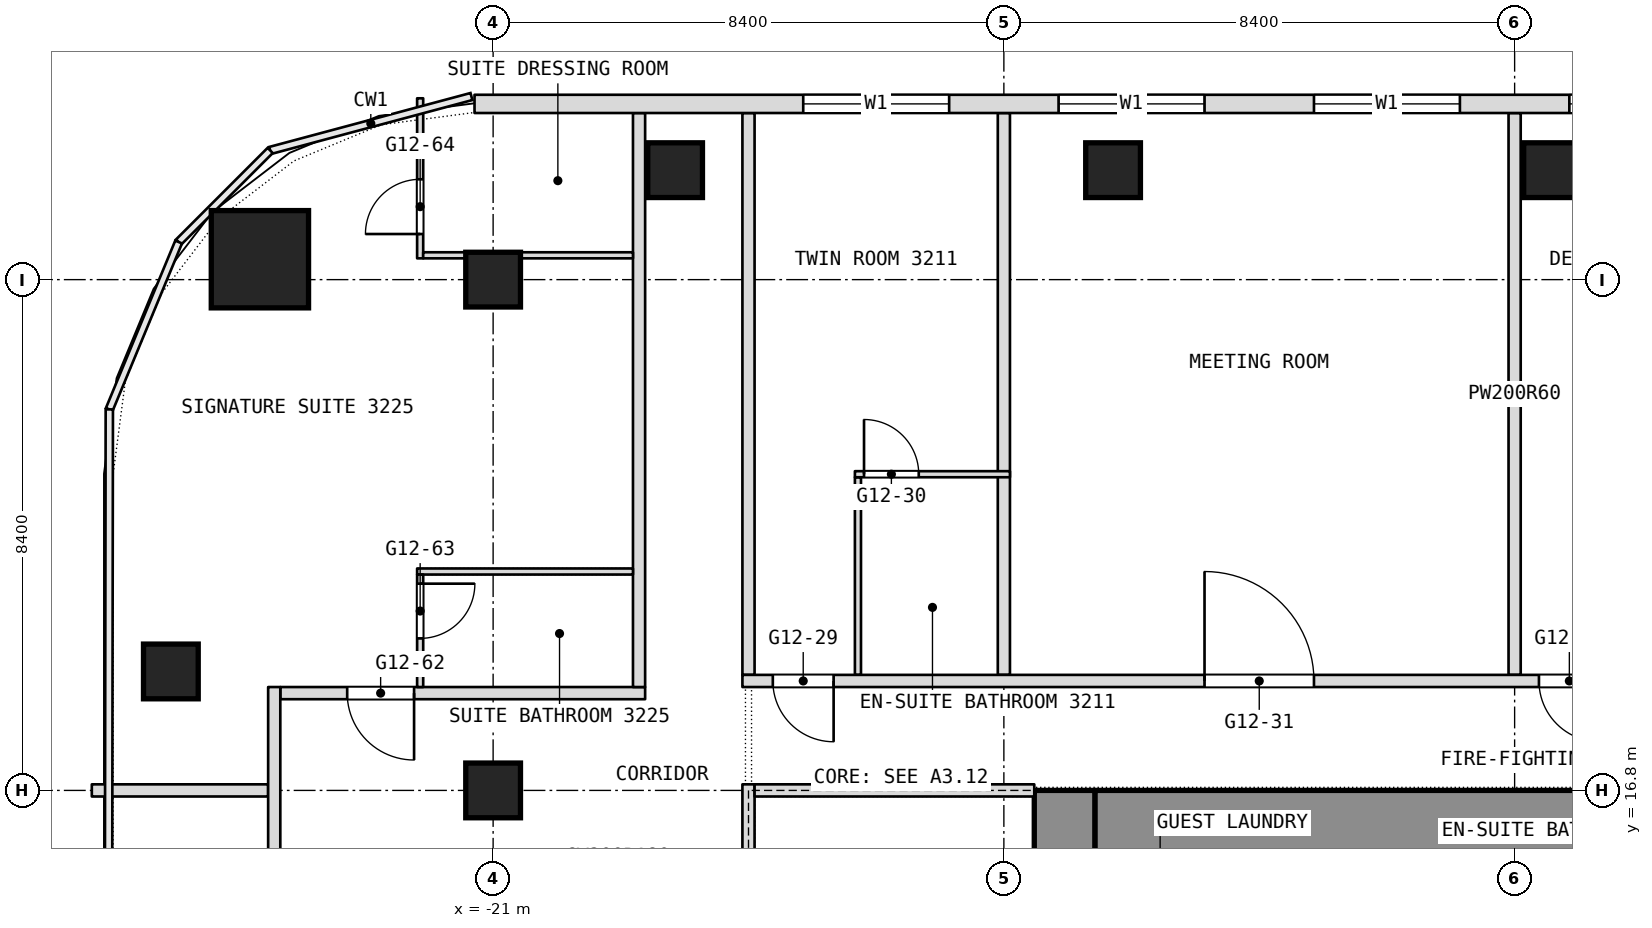
"""IFC4 building model, lengths in metres.
Left out: names, types, materials, properties, quantities, classifications, styles, units other than length and angle.
Written with IfcOpenShell. Run it as: python <this file> out.ifc"""

import sys

from ifc_helpers import new_model, si_unit, direction, frame, frame_2d, origin, origin_2d, place, context, subcontext, project, spatial, rectangle, extrude, element, fill, save


model = new_model("IFC4")
c1 = context("Model", 3, precision=1e-05, world=origin(), true_north=direction((0.0, 1.0)))
c2 = subcontext(c1, "Body", "Model", "MODEL_VIEW")
j1 = project(units=[si_unit("LENGTHUNIT", "METRE"), si_unit("PLANEANGLEUNIT", "RADIAN")], contexts=[c1])
p1 = place(None, origin())
s1 = spatial("IfcSite", under=j1, at=p1, CompositionType="ELEMENT")
p2 = place(p1, origin())
s2 = spatial("IfcBuilding", under=s1, at=p2, CompositionType="ELEMENT")
p3 = place(p2, frame((0.0, 0.0, 140.9)))
s3 = spatial("IfcBuildingStorey", under=s2, at=p3, CompositionType="ELEMENT", Elevation=140.9)
p4 = place(p3, frame((-11.6, 0.0, 0.0), z_axis=(0.0, 0.0, 1.0), x_axis=(0.0, 1.0, 0.0)))
e1 = element("IfcWall", 1, at=p4, inside=s3, PredefinedType="SHEAR", context=c2, shape_type="SweptSolid", body=[
    extrude(rectangle(XDim=16.8, YDim=1.0, at=frame_2d((8.4, 0.0))), origin(), (0.0, 0.0, 1.0), 3.6),
])
p5 = place(p4, frame((1.837, 0.0, 0.0)))
e2 = element("IfcOpeningElement", 2, at=p5, cuts=e1, PredefinedType="OPENING", context=c2, shape_type="SweptSolid", body=[
    extrude(rectangle(XDim=0.9, YDim=2.1, at=frame_2d((0.45, 1.05))), frame((0.0, 0.5, 0.0), z_axis=(0.0, -1.0, 0.0), x_axis=(1.0, 0.0, 0.0)), (0.0, 0.0, 1.0), 1.0),
])
p6 = place(p4, frame((4.462, 0.0, 0.0)))
e3 = element("IfcOpeningElement", 3, at=p6, cuts=e1, PredefinedType="OPENING", context=c2, shape_type="SweptSolid", body=[
    extrude(rectangle(XDim=0.9, YDim=2.1, at=frame_2d((0.45, 1.05))), frame((0.0, 0.5, 0.0), z_axis=(0.0, -1.0, 0.0), x_axis=(1.0, 0.0, 0.0)), (0.0, 0.0, 1.0), 1.0),
])
p7 = place(p4, frame((6.825, 0.0, 0.0)))
e4 = element("IfcOpeningElement", 4, at=p7, cuts=e1, PredefinedType="OPENING", context=c2, shape_type="SweptSolid", body=[
    extrude(rectangle(XDim=1.2, YDim=2.1, at=frame_2d((0.6, 1.05))), frame((0.0, 0.5, 0.0), z_axis=(0.0, -1.0, 0.0), x_axis=(1.0, 0.0, 0.0)), (0.0, 0.0, 1.0), 1.0),
])
p8 = place(p4, frame((12.3, 0.0, 0.0)))
e5 = element("IfcOpeningElement", 5, at=p8, cuts=e1, PredefinedType="OPENING", context=c2, shape_type="SweptSolid", body=[
    extrude(rectangle(XDim=0.9, YDim=2.1, at=frame_2d((0.45, 1.05))), frame((0.0, 0.5, 0.0), z_axis=(0.0, -1.0, 0.0), x_axis=(1.0, 0.0, 0.0)), (0.0, 0.0, 1.0), 1.0),
])
p9 = place(p4, frame((8.775, 0.0, 0.0)))
e6 = element("IfcOpeningElement", 6, at=p9, cuts=e1, PredefinedType="OPENING", context=c2, shape_type="SweptSolid", body=[
    extrude(rectangle(XDim=1.2, YDim=2.1, at=frame_2d((0.6, 1.05))), frame((0.0, 0.5, 0.0), z_axis=(0.0, -1.0, 0.0), x_axis=(1.0, 0.0, 0.0)), (0.0, 0.0, 1.0), 1.0),
])
p10 = place(p3, frame((-11.1, 16.3, 0.0), z_axis=(0.0, 0.0, 1.0), x_axis=(1.0, 0.0, 0.0)))
e7 = element("IfcWall", 7, at=p10, inside=s3, PredefinedType="SHEAR", context=c2, shape_type="SweptSolid", body=[
    extrude(rectangle(XDim=22.2, YDim=1.0, at=frame_2d((11.1, 0.0))), origin(), (0.0, 0.0, 1.0), 3.6),
])
p11 = place(p3, frame((-24.835, 25.535, 0.0), z_axis=(0.0, 0.0, 1.0), x_axis=(1.0, 0.0, 0.0)))
e8 = element("IfcColumn", 8, at=p11, inside=s3, PredefinedType="COLUMN", context=c2, shape_type="SweptSolid", body=[
    extrude(rectangle(XDim=1.6, YDim=1.6, at=origin_2d()), origin(), (0.0, 0.0, 1.0), 3.6),
])
for number, where, z_axis, x_axis in (
    (9, (-21.0, 16.8, 0.0), (0.0, 0.0, 1.0), (1.0, 0.0, 0.0)),
    (10, (-21.0, 25.2, 0.0), (0.0, 0.0, 1.0), (1.0, 0.0, 0.0)),
    (11, (-26.3, 18.756, 0.0), (0.0, 0.0, 1.0), (1.0, 0.0, 0.0)),
    (12, (-18.007, 27.0, 0.0), (0.0, 0.0, 1.0), (1.0, 0.0, 0.0)),
    (13, (-10.804, 27.0, 0.0), (0.0, 0.0, 1.0), (1.0, 0.0, 0.0)),
    (14, (-3.601, 27.0, 0.0), (0.0, 0.0, 1.0), (1.0, 0.0, 0.0)),
):
    element("IfcColumn", number, at=place(p3, frame(where, z_axis=z_axis, x_axis=x_axis)), inside=s3, PredefinedType="COLUMN", context=c2, shape_type="SweptSolid", body=[
        extrude(rectangle(XDim=0.9, YDim=0.9, at=origin_2d()), origin(), (0.0, 0.0, 1.0), 3.6),
    ])
for number, where, z_axis, x_axis in (
    (15, (-4.2, 18.7, 0.0), (0.0, 0.0, 1.0), (0.0, 1.0, 0.0)),
    (16, (-12.6, 18.7, 0.0), (0.0, 0.0, 1.0), (0.0, 1.0, 0.0)),
):
    element("IfcWall", number, at=place(p3, frame(where, z_axis=z_axis, x_axis=x_axis)), inside=s3, PredefinedType="PARTITIONING", context=c2, shape_type="SweptSolid", body=[
        extrude(rectangle(XDim=9.24, YDim=0.2, at=frame_2d((4.62, 0.0))), origin(), (0.0, 0.0, 1.0), 3.34),
    ])
p12 = place(p3, frame((-15.0, 18.7, 0.0), z_axis=(0.0, 0.0, 1.0), x_axis=(0.0, 1.0, 0.0)))
e17 = element("IfcWall", 17, at=p12, inside=s3, PredefinedType="PARTITIONING", context=c2, shape_type="SweptSolid", body=[
    extrude(rectangle(XDim=3.25, YDim=0.1, at=frame_2d((1.625, 0.0))), origin(), (0.0, 0.0, 1.0), 3.34),
])
p13 = place(p3, frame((-16.8, 18.7, 0.0), z_axis=(0.0, 0.0, 1.0), x_axis=(0.0, 1.0, 0.0)))
e18 = element("IfcWall", 18, at=p13, inside=s3, PredefinedType="PARTITIONING", context=c2, shape_type="SweptSolid", body=[
    extrude(rectangle(XDim=9.24, YDim=0.2, at=frame_2d((4.62, 0.0))), origin(), (0.0, 0.0, 1.0), 3.34),
])
p14 = place(p3, frame((-27.6, 16.8, 0.0), z_axis=(0.0, 0.0, 1.0), x_axis=(1.0, 0.0, 0.0)))
e19 = element("IfcWall", 19, at=p14, inside=s3, PredefinedType="PARTITIONING", context=c2, shape_type="SweptSolid", body=[
    extrude(rectangle(XDim=2.9, YDim=0.2, at=frame_2d((1.45, 0.0))), origin(), (0.0, 0.0, 1.0), 2.89),
])
p15 = place(p3, frame((-24.5, 18.4, 0.0), z_axis=(0.0, 0.0, 1.0), x_axis=(1.0, 0.0, 0.0)))
e20 = element("IfcWall", 20, at=p15, inside=s3, PredefinedType="PARTITIONING", context=c2, shape_type="SweptSolid", body=[
    extrude(rectangle(XDim=6.0, YDim=0.2, at=frame_2d((3.0, 0.0))), origin(), (0.0, 0.0, 1.0), 3.34),
])
p16 = place(p15, frame((1.1, 0.0, 0.0)))
e21 = element("IfcOpeningElement", 21, at=p16, cuts=e20, PredefinedType="OPENING", context=c2, shape_type="SweptSolid", body=[
    extrude(rectangle(XDim=1.1, YDim=2.1, at=frame_2d((0.55, 1.05))), frame((0.0, 0.1, 0.0), z_axis=(0.0, -1.0, 0.0), x_axis=(1.0, 0.0, 0.0)), (0.0, 0.0, 1.0), 0.2),
])
p17 = place(p3, frame((-18.6, 18.5, 0.0), z_axis=(0.0, 0.0, 1.0), x_axis=(0.0, 1.0, 0.0)))
e22 = element("IfcWall", 22, at=p17, inside=s3, PredefinedType="PARTITIONING", context=c2, shape_type="SweptSolid", body=[
    extrude(rectangle(XDim=9.44, YDim=0.2, at=frame_2d((4.72, 0.0))), origin(), (0.0, 0.0, 1.0), 3.34),
])
p18 = place(p3, frame((-16.9, 18.6, 0.0), z_axis=(0.0, 0.0, 1.0), x_axis=(1.0, 0.0, 0.0)))
e23 = element("IfcWall", 23, at=p18, inside=s3, PredefinedType="PARTITIONING", context=c2, shape_type="SweptSolid", body=[
    extrude(rectangle(XDim=18.4, YDim=0.2, at=frame_2d((9.2, 0.0))), origin(), (0.0, 0.0, 1.0), 3.34),
])
p19 = place(p18, frame((0.5, 0.0, 0.0)))
e24 = element("IfcOpeningElement", 24, at=p19, cuts=e23, PredefinedType="OPENING", context=c2, shape_type="SweptSolid", body=[
    extrude(rectangle(XDim=1.0, YDim=2.1, at=frame_2d((0.5, 1.05))), frame((0.0, 0.1, 0.0), z_axis=(0.0, -1.0, 0.0), x_axis=(1.0, 0.0, 0.0)), (0.0, 0.0, 1.0), 0.2),
])
p20 = place(p18, frame((7.6, 0.0, 0.0)))
e25 = element("IfcOpeningElement", 25, at=p20, cuts=e23, PredefinedType="OPENING", context=c2, shape_type="SweptSolid", body=[
    extrude(rectangle(XDim=1.8, YDim=2.1, at=frame_2d((0.9, 1.05))), frame((0.0, 0.1, 0.0), z_axis=(0.0, -1.0, 0.0), x_axis=(1.0, 0.0, 0.0)), (0.0, 0.0, 1.0), 0.2),
])
p21 = place(p18, frame((13.1, 0.0, 0.0)))
e26 = element("IfcOpeningElement", 26, at=p21, cuts=e23, PredefinedType="OPENING", context=c2, shape_type="SweptSolid", body=[
    extrude(rectangle(XDim=1.0, YDim=2.1, at=frame_2d((0.5, 1.05))), frame((0.0, 0.1, 0.0), z_axis=(0.0, -1.0, 0.0), x_axis=(1.0, 0.0, 0.0)), (0.0, 0.0, 1.0), 0.2),
])
p22 = place(p3, frame((-22.25, 20.4, 0.0), z_axis=(0.0, 0.0, 1.0), x_axis=(1.0, 0.0, 0.0)))
e27 = element("IfcWall", 27, at=p22, inside=s3, PredefinedType="PARTITIONING", context=c2, shape_type="SweptSolid", body=[
    extrude(rectangle(XDim=3.55, YDim=0.1, at=frame_2d((1.775, 0.0))), origin(), (0.0, 0.0, 1.0), 3.34),
])
p23 = place(p3, frame((-15.05, 22.0, 0.0), z_axis=(0.0, 0.0, 1.0), x_axis=(1.0, 0.0, 0.0)))
e28 = element("IfcWall", 28, at=p23, inside=s3, PredefinedType="PARTITIONING", context=c2, shape_type="SweptSolid", body=[
    extrude(rectangle(XDim=2.55, YDim=0.1, at=frame_2d((1.275, 0.0))), origin(), (0.0, 0.0, 1.0), 3.34),
])
p24 = place(p23, frame((0.15, 0.0, 0.0)))
e29 = element("IfcOpeningElement", 29, at=p24, cuts=e28, PredefinedType="OPENING", context=c2, shape_type="SweptSolid", body=[
    extrude(rectangle(XDim=0.9, YDim=2.1, at=frame_2d((0.45, 1.05))), frame((0.0, 0.05, 0.0), z_axis=(0.0, -1.0, 0.0), x_axis=(1.0, 0.0, 0.0)), (0.0, 0.0, 1.0), 0.1),
])
p25 = place(p3, frame((-22.2, 18.5, 0.0), z_axis=(0.0, 0.0, 1.0), x_axis=(0.0, 1.0, 0.0)))
e30 = element("IfcWall", 30, at=p25, inside=s3, PredefinedType="PARTITIONING", context=c2, shape_type="SweptSolid", body=[
    extrude(rectangle(XDim=1.85, YDim=0.1, at=frame_2d((0.925, 0.0))), origin(), (0.0, 0.0, 1.0), 3.34),
])
p26 = place(p25, frame((0.8, 0.0, 0.0)))
e31 = element("IfcOpeningElement", 31, at=p26, cuts=e30, PredefinedType="OPENING", context=c2, shape_type="SweptSolid", body=[
    extrude(rectangle(XDim=0.9, YDim=2.1, at=frame_2d((0.45, 1.05))), frame((0.0, 0.05, 0.0), z_axis=(0.0, -1.0, 0.0), x_axis=(1.0, 0.0, 0.0)), (0.0, 0.0, 1.0), 0.1),
])
p27 = place(p3, frame((-22.2, 25.55, 0.0), z_axis=(0.0, 0.0, 1.0), x_axis=(0.0, 1.0, 0.0)))
e32 = element("IfcWall", 32, at=p27, inside=s3, PredefinedType="PARTITIONING", context=c2, shape_type="SweptSolid", body=[
    extrude(rectangle(XDim=2.632, YDim=0.1, at=frame_2d((1.316, 0.0))), origin(), (0.0, 0.0, 1.0), 3.34),
])
p28 = place(p27, frame((0.4, 0.0, 0.0)))
e33 = element("IfcOpeningElement", 33, at=p28, cuts=e32, PredefinedType="OPENING", context=c2, shape_type="SweptSolid", body=[
    extrude(rectangle(XDim=0.9, YDim=2.1, at=frame_2d((0.45, 1.05))), frame((0.0, 0.05, 0.0), z_axis=(0.0, -1.0, 0.0), x_axis=(1.0, 0.0, 0.0)), (0.0, 0.0, 1.0), 0.1),
])
p29 = place(p3, frame((-24.6, 6.9, 0.0), z_axis=(0.0, 0.0, 1.0), x_axis=(0.0, 1.0, 0.0)))
e34 = element("IfcWall", 34, at=p29, inside=s3, PredefinedType="PARTITIONING", context=c2, shape_type="SweptSolid", body=[
    extrude(rectangle(XDim=11.6, YDim=0.2, at=frame_2d((5.8, 0.0))), origin(), (0.0, 0.0, 1.0), 3.34),
])
p30 = place(p29, frame((5.45, 0.0, 0.0)))
e35 = element("IfcOpeningElement", 35, at=p30, cuts=e34, PredefinedType="OPENING", context=c2, shape_type="SweptSolid", body=[
    extrude(rectangle(XDim=1.8, YDim=2.1, at=frame_2d((0.9, 1.05))), frame((0.0, 0.1, 0.0), z_axis=(0.0, -1.0, 0.0), x_axis=(1.0, 0.0, 0.0)), (0.0, 0.0, 1.0), 0.2),
])
p31 = place(p29, frame((0.3, 0.0, 0.0)))
e36 = element("IfcOpeningElement", 36, at=p31, cuts=e34, PredefinedType="OPENING", context=c2, shape_type="SweptSolid", body=[
    extrude(rectangle(XDim=1.0, YDim=2.1, at=frame_2d((0.5, 1.05))), frame((0.0, 0.1, 0.0), z_axis=(0.0, -1.0, 0.0), x_axis=(1.0, 0.0, 0.0)), (0.0, 0.0, 1.0), 0.2),
])
p32 = place(p3, frame((-22.15, 25.6, 0.0), z_axis=(0.0, 0.0, 1.0), x_axis=(1.0, 0.0, 0.0)))
e37 = element("IfcWall", 37, at=p32, inside=s3, PredefinedType="PARTITIONING", context=c2, shape_type="SweptSolid", body=[
    extrude(rectangle(XDim=3.45, YDim=0.1, at=frame_2d((1.725, 0.0))), origin(), (0.0, 0.0, 1.0), 3.34),
])
p33 = place(p3, frame((21.306, 28.09, 0.0), z_axis=(0.0, 0.0, 1.0), x_axis=(-1.0, 0.0, 0.0)))
e38 = element("IfcWall", 38, at=p33, inside=s3, PredefinedType="NOTDEFINED", context=c2, shape_type="SweptSolid", body=[
    extrude(rectangle(XDim=42.612, YDim=0.3, at=frame_2d((21.306, 0.0))), origin(), (0.0, 0.0, 1.0), 3.6),
])
p34 = place(p33, frame((5.406, 0.0, 0.9)))
e39 = element("IfcOpeningElement", 39, at=p34, cuts=e38, PredefinedType="OPENING", context=c2, shape_type="SweptSolid", body=[
    extrude(rectangle(XDim=2.4, YDim=2.1, at=frame_2d((1.2, 1.05))), frame((0.0, 0.15, 0.0), z_axis=(0.0, -1.0, 0.0), x_axis=(1.0, 0.0, 0.0)), (0.0, 0.0, 1.0), 0.3),
])
p35 = place(p33, frame((9.606, 0.0, 0.9)))
e40 = element("IfcOpeningElement", 40, at=p35, cuts=e38, PredefinedType="OPENING", context=c2, shape_type="SweptSolid", body=[
    extrude(rectangle(XDim=2.4, YDim=2.1, at=frame_2d((1.2, 1.05))), frame((0.0, 0.15, 0.0), z_axis=(0.0, -1.0, 0.0), x_axis=(1.0, 0.0, 0.0)), (0.0, 0.0, 1.0), 0.3),
])
p36 = place(p33, frame((13.806, 0.0, 0.9)))
e41 = element("IfcOpeningElement", 41, at=p36, cuts=e38, PredefinedType="OPENING", context=c2, shape_type="SweptSolid", body=[
    extrude(rectangle(XDim=2.4, YDim=2.1, at=frame_2d((1.2, 1.05))), frame((0.0, 0.15, 0.0), z_axis=(0.0, -1.0, 0.0), x_axis=(1.0, 0.0, 0.0)), (0.0, 0.0, 1.0), 0.3),
])
p37 = place(p33, frame((18.006, 0.0, 0.9)))
e42 = element("IfcOpeningElement", 42, at=p37, cuts=e38, PredefinedType="OPENING", context=c2, shape_type="SweptSolid", body=[
    extrude(rectangle(XDim=2.4, YDim=2.1, at=frame_2d((1.2, 1.05))), frame((0.0, 0.15, 0.0), z_axis=(0.0, -1.0, 0.0), x_axis=(1.0, 0.0, 0.0)), (0.0, 0.0, 1.0), 0.3),
])
p38 = place(p33, frame((22.206, 0.0, 0.9)))
e43 = element("IfcOpeningElement", 43, at=p38, cuts=e38, PredefinedType="OPENING", context=c2, shape_type="SweptSolid", body=[
    extrude(rectangle(XDim=2.4, YDim=2.1, at=frame_2d((1.2, 1.05))), frame((0.0, 0.15, 0.0), z_axis=(0.0, -1.0, 0.0), x_axis=(1.0, 0.0, 0.0)), (0.0, 0.0, 1.0), 0.3),
])
p39 = place(p33, frame((26.406, 0.0, 0.9)))
e44 = element("IfcOpeningElement", 44, at=p39, cuts=e38, PredefinedType="OPENING", context=c2, shape_type="SweptSolid", body=[
    extrude(rectangle(XDim=2.4, YDim=2.1, at=frame_2d((1.2, 1.05))), frame((0.0, 0.15, 0.0), z_axis=(0.0, -1.0, 0.0), x_axis=(1.0, 0.0, 0.0)), (0.0, 0.0, 1.0), 0.3),
])
p40 = place(p33, frame((30.606, 0.0, 0.9)))
e45 = element("IfcOpeningElement", 45, at=p40, cuts=e38, PredefinedType="OPENING", context=c2, shape_type="SweptSolid", body=[
    extrude(rectangle(XDim=2.4, YDim=2.1, at=frame_2d((1.2, 1.05))), frame((0.0, 0.15, 0.0), z_axis=(0.0, -1.0, 0.0), x_axis=(1.0, 0.0, 0.0)), (0.0, 0.0, 1.0), 0.3),
])
p41 = place(p33, frame((34.806, 0.0, 0.9)))
e46 = element("IfcOpeningElement", 46, at=p41, cuts=e38, PredefinedType="OPENING", context=c2, shape_type="SweptSolid", body=[
    extrude(rectangle(XDim=2.4, YDim=2.1, at=frame_2d((1.2, 1.05))), frame((0.0, 0.15, 0.0), z_axis=(0.0, -1.0, 0.0), x_axis=(1.0, 0.0, 0.0)), (0.0, 0.0, 1.0), 0.3),
])
p42 = place(p3, frame((-16.8, -0.1, 0.0), z_axis=(0.0, 0.0, 1.0), x_axis=(0.0, 1.0, 0.0)))
e47 = element("IfcWall", 47, at=p42, inside=s3, PredefinedType="PARTITIONING", context=c2, shape_type="SweptSolid", body=[
    extrude(rectangle(XDim=17.0, YDim=0.2, at=frame_2d((8.5, 0.0))), origin(), (0.0, 0.0, 1.0), 3.34),
])
p43 = place(p42, frame((2.2, 0.0, 0.0)))
e48 = element("IfcOpeningElement", 48, at=p43, cuts=e47, PredefinedType="OPENING", context=c2, shape_type="SweptSolid", body=[
    extrude(rectangle(XDim=1.8, YDim=2.1, at=frame_2d((0.9, 1.05))), frame((0.0, 0.1, 0.0), z_axis=(0.0, -1.0, 0.0), x_axis=(1.0, 0.0, 0.0)), (0.0, 0.0, 1.0), 0.2),
])
p44 = place(p42, frame((7.2, 0.0, 0.0)))
e49 = element("IfcOpeningElement", 49, at=p44, cuts=e47, PredefinedType="OPENING", context=c2, shape_type="SweptSolid", body=[
    extrude(rectangle(XDim=1.8, YDim=2.1, at=frame_2d((0.9, 1.05))), frame((0.0, 0.1, 0.0), z_axis=(0.0, -1.0, 0.0), x_axis=(1.0, 0.0, 0.0)), (0.0, 0.0, 1.0), 0.2),
])
p45 = place(p3, frame((-16.7, 16.8, 0.0), z_axis=(0.0, 0.0, 1.0), x_axis=(1.0, 0.0, 0.0)))
e50 = element("IfcWall", 50, at=p45, inside=s3, PredefinedType="PARTITIONING", context=c2, shape_type="SweptSolid", body=[
    extrude(rectangle(XDim=4.6, YDim=0.2, at=frame_2d((2.3, 0.0))), origin(), (0.0, 0.0, 1.0), 2.89),
])
p46 = place(p16, origin())
e51 = element("IfcDoor", 51, at=p46, inside=s3, OperationType="SINGLE_SWING_RIGHT", PredefinedType="DOOR", context=c2, shape_type="SweptSolid", body=[
    extrude(rectangle(XDim=1.1, YDim=2.1, at=frame_2d((0.55, 1.05))), frame((0.0, 0.025, 0.0), z_axis=(0.0, -1.0, 0.0), x_axis=(1.0, 0.0, 0.0)), (0.0, 0.0, 1.0), 0.05),
])
fill(e21, e51)
p47 = place(p19, origin())
e52 = element("IfcDoor", 52, at=p47, inside=s3, OperationType="SINGLE_SWING_RIGHT", PredefinedType="DOOR", context=c2, shape_type="SweptSolid", body=[
    extrude(rectangle(XDim=1.0, YDim=2.1, at=frame_2d((0.5, 1.05))), frame((0.0, 0.025, 0.0), z_axis=(0.0, -1.0, 0.0), x_axis=(1.0, 0.0, 0.0)), (0.0, 0.0, 1.0), 0.05),
])
fill(e24, e52)
p48 = place(p20, origin())
e53 = element("IfcDoor", 53, at=p48, inside=s3, OperationType="DOUBLE_DOOR_SINGLE_SWING", PredefinedType="DOOR", context=c2, shape_type="SweptSolid", body=[
    extrude(rectangle(XDim=1.8, YDim=2.1, at=frame_2d((0.9, 1.05))), frame((0.0, 0.025, 0.0), z_axis=(0.0, -1.0, 0.0), x_axis=(1.0, 0.0, 0.0)), (0.0, 0.0, 1.0), 0.05),
])
fill(e25, e53)
p49 = place(p21, origin())
e54 = element("IfcDoor", 54, at=p49, inside=s3, OperationType="SINGLE_SWING_LEFT", PredefinedType="DOOR", context=c2, shape_type="SweptSolid", body=[
    extrude(rectangle(XDim=1.0, YDim=2.1, at=frame_2d((0.5, 1.05))), frame((0.0, 0.025, 0.0), z_axis=(0.0, -1.0, 0.0), x_axis=(1.0, 0.0, 0.0)), (0.0, 0.0, 1.0), 0.05),
])
fill(e26, e54)
p50 = place(p24, origin())
e55 = element("IfcDoor", 55, at=p50, inside=s3, OperationType="SINGLE_SWING_RIGHT", PredefinedType="DOOR", context=c2, shape_type="SweptSolid", body=[
    extrude(rectangle(XDim=0.9, YDim=2.1, at=frame_2d((0.45, 1.05))), frame((0.0, 0.025, 0.0), z_axis=(0.0, -1.0, 0.0), x_axis=(1.0, 0.0, 0.0)), (0.0, 0.0, 1.0), 0.05),
])
fill(e29, e55)
p51 = place(p26, origin())
e56 = element("IfcDoor", 56, at=p51, inside=s3, OperationType="SINGLE_SWING_LEFT", PredefinedType="DOOR", context=c2, shape_type="SweptSolid", body=[
    extrude(rectangle(XDim=0.9, YDim=2.1, at=frame_2d((0.45, 1.05))), frame((0.0, 0.025, 0.0), z_axis=(0.0, -1.0, 0.0), x_axis=(1.0, 0.0, 0.0)), (0.0, 0.0, 1.0), 0.05),
])
fill(e31, e56)
p52 = place(p28, origin())
e57 = element("IfcDoor", 57, at=p52, inside=s3, OperationType="SINGLE_SWING_RIGHT", PredefinedType="DOOR", context=c2, shape_type="SweptSolid", body=[
    extrude(rectangle(XDim=0.9, YDim=2.1, at=frame_2d((0.45, 1.05))), frame((0.0, 0.025, 0.0), z_axis=(0.0, -1.0, 0.0), x_axis=(1.0, 0.0, 0.0)), (0.0, 0.0, 1.0), 0.05),
])
fill(e33, e57)
p53 = place(p38, origin())
e58 = element("IfcWindow", 58, at=p53, inside=s3, PartitioningType="SINGLE_PANEL", PredefinedType="WINDOW", context=c2, shape_type="SweptSolid", body=[
    extrude(rectangle(XDim=2.4, YDim=2.1, at=frame_2d((1.2, 1.05))), frame((0.0, 0.03, 0.0), z_axis=(0.0, -1.0, 0.0), x_axis=(1.0, 0.0, 0.0)), (0.0, 0.0, 1.0), 0.06),
])
fill(e43, e58)
p54 = place(p39, origin())
e59 = element("IfcWindow", 59, at=p54, inside=s3, PartitioningType="SINGLE_PANEL", PredefinedType="WINDOW", context=c2, shape_type="SweptSolid", body=[
    extrude(rectangle(XDim=2.4, YDim=2.1, at=frame_2d((1.2, 1.05))), frame((0.0, 0.03, 0.0), z_axis=(0.0, -1.0, 0.0), x_axis=(1.0, 0.0, 0.0)), (0.0, 0.0, 1.0), 0.06),
])
fill(e44, e59)
p55 = place(p40, origin())
e60 = element("IfcWindow", 60, at=p55, inside=s3, PartitioningType="SINGLE_PANEL", PredefinedType="WINDOW", context=c2, shape_type="SweptSolid", body=[
    extrude(rectangle(XDim=2.4, YDim=2.1, at=frame_2d((1.2, 1.05))), frame((0.0, 0.03, 0.0), z_axis=(0.0, -1.0, 0.0), x_axis=(1.0, 0.0, 0.0)), (0.0, 0.0, 1.0), 0.06),
])
fill(e45, e60)
p56 = place(p41, origin())
e61 = element("IfcWindow", 61, at=p56, inside=s3, PartitioningType="SINGLE_PANEL", PredefinedType="WINDOW", context=c2, shape_type="SweptSolid", body=[
    extrude(rectangle(XDim=2.4, YDim=2.1, at=frame_2d((1.2, 1.05))), frame((0.0, 0.03, 0.0), z_axis=(0.0, -1.0, 0.0), x_axis=(1.0, 0.0, 0.0)), (0.0, 0.0, 1.0), 0.06),
])
fill(e46, e61)
save(model, sys.argv[1])
